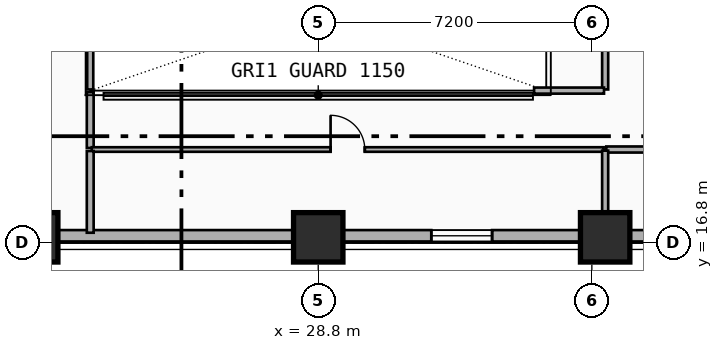
"""IFC4 building model, lengths in metres.
Left out: names, types, materials, properties, quantities, classifications, styles, units other than length and angle.
Written with IfcOpenShell. Run it as: python <this file> out.ifc"""

import sys

from ifc_helpers import new_model, si_unit, direction, frame, frame_2d, origin, origin_2d, place, context, subcontext, project, spatial, rectangle, extrude, element, fill, save


model = new_model("IFC4")
c1 = context("Model", 3, precision=1e-05, world=origin(), true_north=direction((0.0, 1.0)))
c2 = subcontext(c1, "Body", "Model", "MODEL_VIEW")
j1 = project(units=[si_unit("LENGTHUNIT", "METRE"), si_unit("PLANEANGLEUNIT", "RADIAN")], contexts=[c1])
p1 = place(None, origin())
s1 = spatial("IfcSite", under=j1, at=p1, CompositionType="ELEMENT")
p2 = place(p1, origin())
s2 = spatial("IfcBuilding", under=s1, at=p2, CompositionType="ELEMENT")
p3 = place(p2, frame((0.0, 0.0, 101.3)))
s3 = spatial("IfcBuildingStorey", under=s2, at=p3, CompositionType="ELEMENT", Elevation=101.3)
for number, where, z_axis, x_axis in (
    (1, (21.3, 17.048, 0.0), (0.0, -0.09, 0.996), (1.0, 0.0, 0.0)),
    (2, (28.8, 17.048, 0.0), (0.0, -0.09, 0.996), (1.0, 0.0, 0.0)),
    (3, (36.35, 17.048, 0.0), (0.0, -0.09, 0.996), (1.0, 0.0, 0.0)),
):
    element("IfcColumn", number, at=place(p3, frame(where, z_axis=z_axis, x_axis=x_axis)), inside=s3, PredefinedType="COLUMN", context=c2, shape_type="SweptSolid", body=[
        extrude(rectangle(XDim=1.3, YDim=1.3, at=origin_2d()), origin(), (0.0, 0.0, 1.0), 3.514),
    ])
p4 = place(p3, frame((53.4, 16.98, 0.0), z_axis=(0.0, 0.0, 1.0), x_axis=(-1.0, 0.0, 0.0)))
e4 = element("IfcWall", 4, at=p4, inside=s3, PredefinedType="SOLIDWALL", context=c2, shape_type="SweptSolid", body=[
    extrude(rectangle(XDim=49.2, YDim=0.3, at=frame_2d((24.6, 0.0))), origin(), (0.0, 0.0, 1.0), 2.86),
])
p5 = place(p4, frame((44.246, 0.0, 0.48)))
e5 = element("IfcOpeningElement", 5, at=p5, cuts=e4, PredefinedType="OPENING", context=c2, shape_type="SweptSolid", body=[
    extrude(rectangle(XDim=1.6, YDim=1.95, at=frame_2d((0.8, 0.975))), frame((0.0, 0.16, 0.0), z_axis=(0.0, -1.0, 0.0), x_axis=(1.0, 0.0, 0.0)), (0.0, 0.0, 1.0), 0.32),
])
p6 = place(p4, frame((42.333, 0.0, 0.68)))
e6 = element("IfcOpeningElement", 6, at=p6, cuts=e4, PredefinedType="OPENING", context=c2, shape_type="SweptSolid", body=[
    extrude(rectangle(XDim=1.2, YDim=1.5, at=frame_2d((0.6, 0.75))), frame((0.0, 0.16, 0.0), z_axis=(0.0, -1.0, 0.0), x_axis=(1.0, 0.0, 0.0)), (0.0, 0.0, 1.0), 0.32),
])
p7 = place(p4, frame((33.338, 0.0, 1.48)))
e7 = element("IfcOpeningElement", 7, at=p7, cuts=e4, PredefinedType="OPENING", context=c2, shape_type="SweptSolid", body=[
    extrude(rectangle(XDim=1.1, YDim=1.05, at=frame_2d((0.55, 0.525))), frame((0.0, 0.16, 0.0), z_axis=(0.0, -1.0, 0.0), x_axis=(1.0, 0.0, 0.0)), (0.0, 0.0, 1.0), 0.32),
])
p8 = place(p4, frame((38.935, 0.0, 0.48)))
e8 = element("IfcOpeningElement", 8, at=p8, cuts=e4, PredefinedType="OPENING", context=c2, shape_type="SweptSolid", body=[
    extrude(rectangle(XDim=1.2, YDim=1.5, at=frame_2d((0.6, 0.75))), frame((0.0, 0.16, 0.0), z_axis=(0.0, -1.0, 0.0), x_axis=(1.0, 0.0, 0.0)), (0.0, 0.0, 1.0), 0.32),
])
p9 = place(p4, frame((20.025, 0.0, 0.73)))
e9 = element("IfcOpeningElement", 9, at=p9, cuts=e4, PredefinedType="OPENING", context=c2, shape_type="SweptSolid", body=[
    extrude(rectangle(XDim=1.6, YDim=1.95, at=frame_2d((0.8, 0.975))), frame((0.0, 0.16, 0.0), z_axis=(0.0, -1.0, 0.0), x_axis=(1.0, 0.0, 0.0)), (0.0, 0.0, 1.0), 0.32),
])
p10 = place(p4, frame((13.65, 0.0, 0.52)))
e10 = element("IfcOpeningElement", 10, at=p10, cuts=e4, PredefinedType="OPENING", context=c2, shape_type="SweptSolid", body=[
    extrude(rectangle(XDim=1.1, YDim=1.05, at=frame_2d((0.55, 0.525))), frame((0.0, 0.16, 0.0), z_axis=(0.0, -1.0, 0.0), x_axis=(1.0, 0.0, 0.0)), (0.0, 0.0, 1.0), 0.32),
])
p11 = place(p4, frame((9.701, 0.0, 1.48)))
e11 = element("IfcOpeningElement", 11, at=p11, cuts=e4, PredefinedType="OPENING", context=c2, shape_type="SweptSolid", body=[
    extrude(rectangle(XDim=1.1, YDim=1.05, at=frame_2d((0.55, 0.525))), frame((0.0, 0.16, 0.0), z_axis=(0.0, -1.0, 0.0), x_axis=(1.0, 0.0, 0.0)), (0.0, 0.0, 1.0), 0.32),
])
p12 = place(p4, frame((3.354, 0.0, 0.48)))
e12 = element("IfcOpeningElement", 12, at=p12, cuts=e4, PredefinedType="OPENING", context=c2, shape_type="SweptSolid", body=[
    extrude(rectangle(XDim=1.6, YDim=1.95, at=frame_2d((0.8, 0.975))), frame((0.0, 0.16, 0.0), z_axis=(0.0, -1.0, 0.0), x_axis=(1.0, 0.0, 0.0)), (0.0, 0.0, 1.0), 0.32),
])
p13 = place(p4, frame((5.667, 0.0, 0.68)))
e13 = element("IfcOpeningElement", 13, at=p13, cuts=e4, PredefinedType="OPENING", context=c2, shape_type="SweptSolid", body=[
    extrude(rectangle(XDim=1.2, YDim=1.5, at=frame_2d((0.6, 0.75))), frame((0.0, 0.16, 0.0), z_axis=(0.0, -1.0, 0.0), x_axis=(1.0, 0.0, 0.0)), (0.0, 0.0, 1.0), 0.32),
])
p14 = place(p3, frame((22.8, 19.29, 0.0), z_axis=(0.0, 0.0, 1.0), x_axis=(0.0, 1.0, 0.0)))
e14 = element("IfcWall", 14, at=p14, inside=s3, PredefinedType="PLUMBINGWALL", context=c2, shape_type="SweptSolid", body=[
    extrude(rectangle(XDim=1.47, YDim=0.18, at=frame_2d((0.735, 0.0))), origin(), (0.0, 0.0, 1.0), 2.68),
])
p15 = place(p3, frame((22.84, 19.25, 0.0), z_axis=(0.0, 0.0, 1.0), x_axis=(1.0, 0.0, 0.0)))
e15 = element("IfcWall", 15, at=p15, inside=s3, PredefinedType="PARTITIONING", context=c2, shape_type="SweptSolid", body=[
    extrude(rectangle(XDim=13.47, YDim=0.12, at=frame_2d((6.735, 0.0))), origin(), (0.0, 0.0, 1.0), 2.31),
])
p16 = place(p15, frame((6.285, 0.0, 0.0)))
e16 = element("IfcOpeningElement", 16, at=p16, cuts=e15, PredefinedType="OPENING", context=c2, shape_type="SweptSolid", body=[
    extrude(rectangle(XDim=0.9, YDim=2.1, at=frame_2d((0.45, 1.05))), frame((0.0, 0.07, 0.0), z_axis=(0.0, -1.0, 0.0), x_axis=(1.0, 0.0, 0.0)), (0.0, 0.0, 1.0), 0.14),
])
p17 = place(p3, frame((22.8, 17.06, 0.0), z_axis=(0.0, 0.0, 1.0), x_axis=(0.0, 1.0, 0.0)))
e17 = element("IfcWall", 17, at=p17, inside=s3, PredefinedType="PLUMBINGWALL", context=c2, shape_type="SweptSolid", body=[
    extrude(rectangle(XDim=2.15, YDim=0.18, at=frame_2d((1.075, 0.0))), origin(), (0.0, 0.0, 1.0), 2.86),
])
p18 = place(p3, frame((36.38, 19.25, 0.0), z_axis=(0.0, 0.0, 1.0), x_axis=(1.0, 0.0, 0.0)))
e18 = element("IfcWall", 18, at=p18, inside=s3, PredefinedType="PARTITIONING", context=c2, shape_type="SweptSolid", body=[
    extrude(rectangle(XDim=1.94, YDim=0.16, at=frame_2d((0.97, 0.0))), origin(), (0.0, 0.0, 1.0), 2.31),
])
p19 = place(p3, frame((36.35, 20.83, 0.0), z_axis=(0.0, 0.0, 1.0), x_axis=(0.0, 1.0, 0.0)))
e19 = element("IfcWall", 19, at=p19, inside=s3, PredefinedType="PARTITIONING", context=c2, shape_type="SweptSolid", body=[
    extrude(rectangle(XDim=4.69, YDim=0.16, at=frame_2d((2.345, 0.0))), origin(), (0.0, 0.0, 1.0), 2.31),
])
p20 = place(p3, frame((34.48, 20.8, 0.0), z_axis=(0.0, 0.0, 1.0), x_axis=(1.0, 0.0, 0.0)))
e20 = element("IfcWall", 20, at=p20, inside=s3, PredefinedType="PARTITIONING", context=c2, shape_type="SweptSolid", body=[
    extrude(rectangle(XDim=1.84, YDim=0.16, at=frame_2d((0.92, 0.0))), origin(), (0.0, 0.0, 1.0), 2.31),
])
p21 = place(p3, frame((22.8, 20.83, 0.0), z_axis=(0.0, 0.0, 1.0), x_axis=(0.0, 1.0, 0.0)))
e21 = element("IfcWall", 21, at=p21, inside=s3, PredefinedType="PARTITIONING", context=c2, shape_type="SweptSolid", body=[
    extrude(rectangle(XDim=1.634, YDim=0.16, at=frame_2d((0.817, 0.0))), origin(), (0.0, 0.0, 1.0), 2.68),
])
p22 = place(p3, frame((36.35, 17.09, 0.0), z_axis=(0.0, 0.0, 1.0), x_axis=(0.0, 1.0, 0.0)))
e22 = element("IfcWall", 22, at=p22, inside=s3, PredefinedType="PARTITIONING", context=c2, shape_type="SweptSolid", body=[
    extrude(rectangle(XDim=2.13, YDim=0.16, at=frame_2d((1.065, 0.0))), origin(), (0.0, 0.0, 1.0), 2.31),
])
p23 = place(p9, origin())
e23 = element("IfcWindow", 23, at=p23, inside=s3, PartitioningType="SINGLE_PANEL", PredefinedType="WINDOW", context=c2, shape_type="SweptSolid", body=[
    extrude(rectangle(XDim=1.6, YDim=1.95, at=frame_2d((0.8, 0.975))), frame((0.0, 0.03, 0.0), z_axis=(0.0, -1.0, 0.0), x_axis=(1.0, 0.0, 0.0)), (0.0, 0.0, 1.0), 0.06),
])
fill(e9, e23)
p24 = place(p16, origin())
e24 = element("IfcDoor", 24, at=p24, inside=s3, OperationType="SINGLE_SWING_LEFT", PredefinedType="DOOR", context=c2, shape_type="SweptSolid", body=[
    extrude(rectangle(XDim=0.9, YDim=2.1, at=frame_2d((0.45, 1.05))), frame((0.0, 0.025, 0.0), z_axis=(0.0, -1.0, 0.0), x_axis=(1.0, 0.0, 0.0)), (0.0, 0.0, 1.0), 0.05),
])
fill(e16, e24)
save(model, sys.argv[1])
